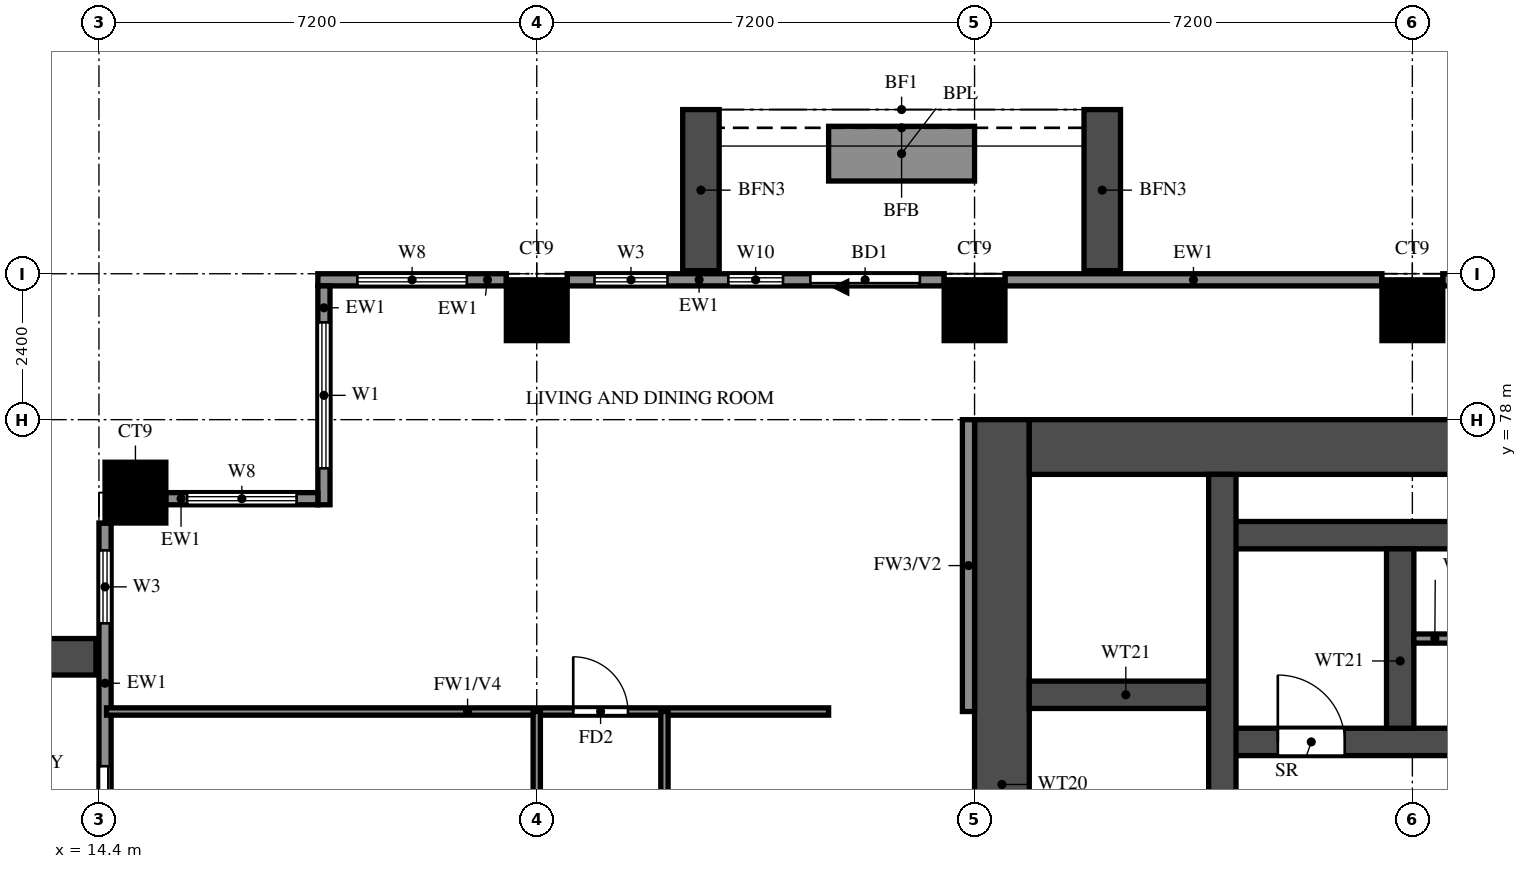
"""IFC4 building model, lengths in metres.
Left out: names, types, materials, properties, quantities, classifications, styles, units other than length and angle.
Written with IfcOpenShell. Run it as: python <this file> out.ifc"""

import sys

from ifc_helpers import new_model, si_unit, direction, frame, frame_2d, origin, origin_2d, place, context, subcontext, project, spatial, rectangle, extrude, source, transform, mapped, element, fill, save


model = new_model("IFC4")
c1 = context("Model", 3, precision=1e-05, world=origin(), true_north=direction((0.0, 1.0)))
c2 = subcontext(c1, "Body", "Model", "MODEL_VIEW")
j1 = project(units=[si_unit("LENGTHUNIT", "METRE"), si_unit("PLANEANGLEUNIT", "RADIAN")], contexts=[c1])
p1 = place(None, origin())
s1 = spatial("IfcSite", under=j1, at=p1, CompositionType="ELEMENT")
p2 = place(p1, origin())
s2 = spatial("IfcBuilding", under=s1, at=p2, CompositionType="ELEMENT")
p3 = place(p2, frame((0.0, 0.0, 86.5)))
s3 = spatial("IfcBuildingStorey", under=s2, at=p3, CompositionType="ELEMENT", Elevation=86.5)
m1 = source(origin(), c2, "Body", "SweptSolid", [
    extrude(rectangle(XDim=1.0, YDim=1.0, at=origin_2d()), origin(), (0.0, 0.0, 1.0), 3.18),
])
for number, where, z_axis, x_axis in (
    (1, (15.0, 76.8, 0.0), (0.0, 0.0, 1.0), (1.0, 0.0, 0.0)),
    (2, (21.6, 79.8, 0.0), (0.0, 0.0, 1.0), (1.0, 0.0, 0.0)),
    (3, (28.8, 79.8, 0.0), (0.0, 0.0, 1.0), (1.0, 0.0, 0.0)),
    (4, (36.0, 79.8, 0.0), (0.0, 0.0, 1.0), (1.0, 0.0, 0.0)),
):
    element("IfcColumn", number, at=place(p3, frame(where, z_axis=z_axis, x_axis=x_axis)), inside=s3, PredefinedType="COLUMN", context=c2, shape_type="MappedRepresentation", body=[
        mapped(m1, transform((0.0, 0.0, 0.0))),
    ])
p4 = place(p3, frame((29.25, 66.0, 0.0), z_axis=(0.0, 0.0, 1.0), x_axis=(0.0, 1.0, 0.0)))
e5 = element("IfcWall", 5, at=p4, inside=s3, PredefinedType="SHEAR", context=c2, shape_type="SweptSolid", body=[
    extrude(rectangle(XDim=12.0, YDim=0.9, at=frame_2d((6.0, 0.0))), origin(), (0.0, 0.0, 1.0), 3.18),
])
p5 = place(p3, frame((29.7, 77.55, 0.0), z_axis=(0.0, 0.0, 1.0), x_axis=(1.0, 0.0, 0.0)))
e6 = element("IfcWall", 6, at=p5, inside=s3, PredefinedType="SHEAR", context=c2, shape_type="SweptSolid", body=[
    extrude(rectangle(XDim=41.4, YDim=0.9, at=frame_2d((20.7, 0.0))), origin(), (0.0, 0.0, 1.0), 3.18),
])
p6 = place(p3, frame((32.875, 72.7, 0.0), z_axis=(0.0, 0.0, 1.0), x_axis=(1.0, 0.0, 0.0)))
e7 = element("IfcWall", 7, at=p6, inside=s3, PredefinedType="SHEAR", context=c2, shape_type="SweptSolid", body=[
    extrude(rectangle(XDim=35.05, YDim=0.45, at=frame_2d((17.525, 0.0))), origin(), (0.0, 0.0, 1.0), 3.18),
])
p7 = place(p6, frame((19.8, 0.0, 0.0)))
e8 = element("IfcOpeningElement", 8, at=p7, cuts=e7, PredefinedType="OPENING", context=c2, shape_type="SweptSolid", body=[
    extrude(rectangle(XDim=1.1, YDim=2.1, at=frame_2d((0.55, 1.05))), frame((0.0, 0.235, 0.0), z_axis=(0.0, -1.0, 0.0), x_axis=(1.0, 0.0, 0.0)), (0.0, 0.0, 1.0), 0.47),
])
p8 = place(p6, frame((27.65, 0.0, 0.0)))
e9 = element("IfcOpeningElement", 9, at=p8, cuts=e7, PredefinedType="OPENING", context=c2, shape_type="SweptSolid", body=[
    extrude(rectangle(XDim=1.1, YDim=2.1, at=frame_2d((0.55, 1.05))), frame((0.0, 0.235, 0.0), z_axis=(0.0, -1.0, 0.0), x_axis=(1.0, 0.0, 0.0)), (0.0, 0.0, 1.0), 0.47),
])
p9 = place(p6, frame((30.25, 0.0, 0.0)))
e10 = element("IfcOpeningElement", 10, at=p9, cuts=e7, PredefinedType="OPENING", context=c2, shape_type="SweptSolid", body=[
    extrude(rectangle(XDim=1.1, YDim=2.1, at=frame_2d((0.55, 1.05))), frame((0.0, 0.235, 0.0), z_axis=(0.0, -1.0, 0.0), x_axis=(1.0, 0.0, 0.0)), (0.0, 0.0, 1.0), 0.47),
])
p10 = place(p6, frame((3.75, 0.0, 0.0)))
e11 = element("IfcOpeningElement", 11, at=p10, cuts=e7, PredefinedType="OPENING", context=c2, shape_type="SweptSolid", body=[
    extrude(rectangle(XDim=1.1, YDim=2.1, at=frame_2d((0.55, 1.05))), frame((0.0, 0.235, 0.0), z_axis=(0.0, -1.0, 0.0), x_axis=(1.0, 0.0, 0.0)), (0.0, 0.0, 1.0), 0.47),
])
p11 = place(p6, frame((6.5, 0.0, 0.0)))
e12 = element("IfcOpeningElement", 12, at=p11, cuts=e7, PredefinedType="OPENING", context=c2, shape_type="SweptSolid", body=[
    extrude(rectangle(XDim=1.1, YDim=2.1, at=frame_2d((0.55, 1.05))), frame((0.0, 0.235, 0.0), z_axis=(0.0, -1.0, 0.0), x_axis=(1.0, 0.0, 0.0)), (0.0, 0.0, 1.0), 0.47),
])
p12 = place(p6, frame((9.25, 0.0, 0.0)))
e13 = element("IfcOpeningElement", 13, at=p12, cuts=e7, PredefinedType="OPENING", context=c2, shape_type="SweptSolid", body=[
    extrude(rectangle(XDim=1.1, YDim=2.1, at=frame_2d((0.55, 1.05))), frame((0.0, 0.235, 0.0), z_axis=(0.0, -1.0, 0.0), x_axis=(1.0, 0.0, 0.0)), (0.0, 0.0, 1.0), 0.47),
])
p13 = place(p6, frame((12.0, 0.0, 0.0)))
e14 = element("IfcOpeningElement", 14, at=p13, cuts=e7, PredefinedType="OPENING", context=c2, shape_type="SweptSolid", body=[
    extrude(rectangle(XDim=1.1, YDim=2.1, at=frame_2d((0.55, 1.05))), frame((0.0, 0.235, 0.0), z_axis=(0.0, -1.0, 0.0), x_axis=(1.0, 0.0, 0.0)), (0.0, 0.0, 1.0), 0.47),
])
p14 = place(p6, frame((14.75, 0.0, 0.0)))
e15 = element("IfcOpeningElement", 15, at=p14, cuts=e7, PredefinedType="OPENING", context=c2, shape_type="SweptSolid", body=[
    extrude(rectangle(XDim=1.1, YDim=2.1, at=frame_2d((0.55, 1.05))), frame((0.0, 0.235, 0.0), z_axis=(0.0, -1.0, 0.0), x_axis=(1.0, 0.0, 0.0)), (0.0, 0.0, 1.0), 0.47),
])
p15 = place(p6, frame((17.5, 0.0, 0.0)))
e16 = element("IfcOpeningElement", 16, at=p15, cuts=e7, PredefinedType="OPENING", context=c2, shape_type="SweptSolid", body=[
    extrude(rectangle(XDim=1.1, YDim=2.1, at=frame_2d((0.55, 1.05))), frame((0.0, 0.235, 0.0), z_axis=(0.0, -1.0, 0.0), x_axis=(1.0, 0.0, 0.0)), (0.0, 0.0, 1.0), 0.47),
])
p16 = place(p6, frame((0.913, 0.0, 0.0)))
e17 = element("IfcOpeningElement", 17, at=p16, cuts=e7, PredefinedType="OPENING", context=c2, shape_type="SweptSolid", body=[
    extrude(rectangle(XDim=1.1, YDim=2.1, at=frame_2d((0.55, 1.05))), frame((0.0, 0.235, 0.0), z_axis=(0.0, -1.0, 0.0), x_axis=(1.0, 0.0, 0.0)), (0.0, 0.0, 1.0), 0.47),
])
p17 = place(p3, frame((32.875, 76.1, 0.0), z_axis=(0.0, 0.0, 1.0), x_axis=(1.0, 0.0, 0.0)))
e18 = element("IfcWall", 18, at=p17, inside=s3, PredefinedType="SHEAR", context=c2, shape_type="SweptSolid", body=[
    extrude(rectangle(XDim=35.05, YDim=0.45, at=frame_2d((17.525, 0.0))), origin(), (0.0, 0.0, 1.0), 3.18),
])
p18 = place(p3, frame((29.7, 73.475, 0.0), z_axis=(0.0, 0.0, 1.0), x_axis=(1.0, 0.0, 0.0)))
e19 = element("IfcWall", 19, at=p18, inside=s3, PredefinedType="SHEAR", context=c2, shape_type="SweptSolid", body=[
    extrude(rectangle(XDim=3.175, YDim=0.45, at=frame_2d((1.587, 0.0))), origin(), (0.0, 0.0, 1.0), 3.18),
])
p19 = place(p3, frame((32.875, 66.45, 0.0), z_axis=(0.0, 0.0, 1.0), x_axis=(0.0, 1.0, 0.0)))
e20 = element("IfcWall", 20, at=p19, inside=s3, PredefinedType="SHEAR", context=c2, shape_type="SweptSolid", body=[
    extrude(rectangle(XDim=10.65, YDim=0.45, at=frame_2d((5.325, 0.0))), origin(), (0.0, 0.0, 1.0), 3.18),
])
p20 = place(p3, frame((35.8, 72.925, 0.0), z_axis=(0.0, 0.0, 1.0), x_axis=(0.0, 1.0, 0.0)))
e21 = element("IfcWall", 21, at=p20, inside=s3, PredefinedType="SHEAR", context=c2, shape_type="SweptSolid", body=[
    extrude(rectangle(XDim=2.95, YDim=0.45, at=frame_2d((1.475, 0.0))), origin(), (0.0, 0.0, 1.0), 3.18),
])
for number, where, z_axis, x_axis in (
    (22, (42.7, 80.3, 0.0), (0.0, 0.0, 1.0), (-1.0, 0.0, 0.0)),
    (23, (35.5, 80.3, 0.0), (0.0, 0.0, 1.0), (-1.0, 0.0, 0.0)),
):
    element("IfcWall", number, at=place(p3, frame(where, z_axis=z_axis, x_axis=x_axis)), inside=s3, PredefinedType="SOLIDWALL", context=c2, shape_type="SweptSolid", body=[
        extrude(rectangle(XDim=6.2, YDim=0.2, at=frame_2d((3.1, 0.0))), origin(), (0.0, 0.0, 1.0), 3.18),
    ])
p21 = place(p3, frame((28.3, 80.3, 0.0), z_axis=(0.0, 0.0, 1.0), x_axis=(-1.0, 0.0, 0.0)))
e24 = element("IfcWall", 24, at=p21, inside=s3, PredefinedType="SOLIDWALL", context=c2, shape_type="SweptSolid", body=[
    extrude(rectangle(XDim=6.2, YDim=0.2, at=frame_2d((3.1, 0.0))), origin(), (0.0, 0.0, 1.0), 3.18),
])
p22 = place(p21, frame((0.4, 0.0, 0.0)))
e25 = element("IfcOpeningElement", 25, at=p22, cuts=e24, PredefinedType="OPENING", context=c2, shape_type="SweptSolid", body=[
    extrude(rectangle(XDim=1.8, YDim=2.4, at=frame_2d((0.9, 1.2))), frame((0.0, 0.11, 0.0), z_axis=(0.0, -1.0, 0.0), x_axis=(1.0, 0.0, 0.0)), (0.0, 0.0, 1.0), 0.22),
])
p23 = place(p21, frame((2.65, 0.0, 0.6)))
e26 = element("IfcOpeningElement", 26, at=p23, cuts=e24, PredefinedType="OPENING", context=c2, shape_type="SweptSolid", body=[
    extrude(rectangle(XDim=0.9, YDim=2.4, at=frame_2d((0.45, 1.2))), frame((0.0, 0.11, 0.0), z_axis=(0.0, -1.0, 0.0), x_axis=(1.0, 0.0, 0.0)), (0.0, 0.0, 1.0), 0.22),
])
p24 = place(p21, frame((4.55, 0.0, 0.6)))
e27 = element("IfcOpeningElement", 27, at=p24, cuts=e24, PredefinedType="OPENING", context=c2, shape_type="SweptSolid", body=[
    extrude(rectangle(XDim=1.2, YDim=2.4, at=frame_2d((0.6, 1.2))), frame((0.0, 0.11, 0.0), z_axis=(0.0, -1.0, 0.0), x_axis=(1.0, 0.0, 0.0)), (0.0, 0.0, 1.0), 0.22),
])
p25 = place(p3, frame((21.1, 80.3, 0.0), z_axis=(0.0, 0.0, 1.0), x_axis=(-1.0, 0.0, 0.0)))
e28 = element("IfcWall", 28, at=p25, inside=s3, PredefinedType="SOLIDWALL", context=c2, shape_type="SweptSolid", body=[
    extrude(rectangle(XDim=3.1, YDim=0.2, at=frame_2d((1.55, 0.0))), origin(), (0.0, 0.0, 1.0), 3.18),
])
p26 = place(p25, frame((0.65, 0.0, 0.6)))
e29 = element("IfcOpeningElement", 29, at=p26, cuts=e28, PredefinedType="OPENING", context=c2, shape_type="SweptSolid", body=[
    extrude(rectangle(XDim=1.8, YDim=2.4, at=frame_2d((0.9, 1.2))), frame((0.0, 0.11, 0.0), z_axis=(0.0, -1.0, 0.0), x_axis=(1.0, 0.0, 0.0)), (0.0, 0.0, 1.0), 0.22),
])
p27 = place(p3, frame((18.1, 80.2, 0.0), z_axis=(0.0, 0.0, 1.0), x_axis=(0.0, -1.0, 0.0)))
e30 = element("IfcWall", 30, at=p27, inside=s3, PredefinedType="SOLIDWALL", context=c2, shape_type="SweptSolid", body=[
    extrude(rectangle(XDim=3.6, YDim=0.2, at=frame_2d((1.8, 0.0))), origin(), (0.0, 0.0, 1.0), 3.18),
])
p28 = place(p27, frame((0.6, 0.0, 0.6)))
e31 = element("IfcOpeningElement", 31, at=p28, cuts=e30, PredefinedType="OPENING", context=c2, shape_type="SweptSolid", body=[
    extrude(rectangle(XDim=2.4, YDim=2.4, at=frame_2d((1.2, 1.2))), frame((0.0, 0.11, 0.0), z_axis=(0.0, -1.0, 0.0), x_axis=(1.0, 0.0, 0.0)), (0.0, 0.0, 1.0), 0.22),
])
p29 = place(p3, frame((18.0, 76.7, 0.0), z_axis=(0.0, 0.0, 1.0), x_axis=(-1.0, 0.0, 0.0)))
e32 = element("IfcWall", 32, at=p29, inside=s3, PredefinedType="SOLIDWALL", context=c2, shape_type="SweptSolid", body=[
    extrude(rectangle(XDim=2.5, YDim=0.2, at=frame_2d((1.25, 0.0))), origin(), (0.0, 0.0, 1.0), 3.18),
])
p30 = place(p29, frame((0.35, 0.0, 0.6)))
e33 = element("IfcOpeningElement", 33, at=p30, cuts=e32, PredefinedType="OPENING", context=c2, shape_type="SweptSolid", body=[
    extrude(rectangle(XDim=1.8, YDim=2.4, at=frame_2d((0.9, 1.2))), frame((0.0, 0.11, 0.0), z_axis=(0.0, -1.0, 0.0), x_axis=(1.0, 0.0, 0.0)), (0.0, 0.0, 1.0), 0.22),
])
p31 = place(p3, frame((14.5, 76.3, 0.0), z_axis=(0.0, 0.0, 1.0), x_axis=(0.0, -1.0, 0.0)))
e34 = element("IfcWall", 34, at=p31, inside=s3, PredefinedType="SOLIDWALL", context=c2, shape_type="SweptSolid", body=[
    extrude(rectangle(XDim=6.2, YDim=0.2, at=frame_2d((3.1, 0.0))), origin(), (0.0, 0.0, 1.0), 3.18),
])
p32 = place(p31, frame((4.0, 0.0, 0.0)))
e35 = element("IfcOpeningElement", 35, at=p32, cuts=e34, PredefinedType="OPENING", context=c2, shape_type="SweptSolid", body=[
    extrude(rectangle(XDim=1.8, YDim=2.4, at=frame_2d((0.9, 1.2))), frame((0.0, 0.11, 0.0), z_axis=(0.0, -1.0, 0.0), x_axis=(1.0, 0.0, 0.0)), (0.0, 0.0, 1.0), 0.22),
])
p33 = place(p31, frame((0.45, 0.0, 0.6)))
e36 = element("IfcOpeningElement", 36, at=p33, cuts=e34, PredefinedType="OPENING", context=c2, shape_type="SweptSolid", body=[
    extrude(rectangle(XDim=1.2, YDim=2.4, at=frame_2d((0.6, 1.2))), frame((0.0, 0.11, 0.0), z_axis=(0.0, -1.0, 0.0), x_axis=(1.0, 0.0, 0.0)), (0.0, 0.0, 1.0), 0.22),
])
for number, where, z_axis, x_axis in (
    (37, (30.9, 80.45, 0.0), (0.0, 0.0, 1.0), (0.0, 1.0, 0.0)),
    (38, (24.3, 80.45, 0.0), (0.0, 0.0, 1.0), (0.0, 1.0, 0.0)),
):
    element("IfcWall", number, at=place(p3, frame(where, z_axis=z_axis, x_axis=x_axis)), inside=s3, PredefinedType="SOLIDWALL", context=c2, shape_type="SweptSolid", body=[
        extrude(rectangle(XDim=2.65, YDim=0.6, at=frame_2d((1.325, 0.0))), origin(), (0.0, 0.0, 1.0), 2.85),
    ])
p34 = place(p3, frame((28.8, 82.375, 0.0), z_axis=(0.0, 0.0, 1.0), x_axis=(-1.0, 0.0, 0.0)))
e39 = element("IfcWall", 39, at=p34, inside=s3, PredefinedType="SOLIDWALL", context=c2, shape_type="SweptSolid", body=[
    extrude(rectangle(XDim=2.4, YDim=0.9, at=frame_2d((1.2, 0.0))), origin(), (0.0, 0.0, 1.0), 0.9),
])
p35 = place(p3, frame((14.35, 74.1, 0.0), z_axis=(0.0, 0.0, 1.0), x_axis=(-1.0, 0.0, 0.0)))
e40 = element("IfcWall", 40, at=p35, inside=s3, PredefinedType="SOLIDWALL", context=c2, shape_type="SweptSolid", body=[
    extrude(rectangle(XDim=2.65, YDim=0.6, at=frame_2d((1.325, 0.0))), origin(), (0.0, 0.0, 1.0), 2.85),
])
p36 = place(p3, frame((36.025, 74.4, 0.0), z_axis=(0.0, 0.0, 1.0), x_axis=(1.0, 0.0, 0.0)))
e41 = element("IfcWall", 41, at=p36, inside=s3, PredefinedType="PARTITIONING", context=c2, shape_type="SweptSolid", body=[
    extrude(rectangle(XDim=2.3, YDim=0.15, at=frame_2d((1.15, 0.0))), origin(), (0.0, 0.0, 1.0), 3.18),
])
p37 = place(p36, frame((0.7, 0.0, 0.0)))
e42 = element("IfcOpeningElement", 42, at=p37, cuts=e41, PredefinedType="OPENING", context=c2, shape_type="SweptSolid", body=[
    extrude(rectangle(XDim=0.9, YDim=2.1, at=frame_2d((0.45, 1.05))), frame((0.0, 0.085, 0.0), z_axis=(0.0, -1.0, 0.0), x_axis=(1.0, 0.0, 0.0)), (0.0, 0.0, 1.0), 0.17),
])
p38 = place(p3, frame((28.7, 73.2, 0.0), z_axis=(0.0, 0.0, 1.0), x_axis=(0.0, 1.0, 0.0)))
e43 = element("IfcWall", 43, at=p38, inside=s3, PredefinedType="SOLIDWALL", context=c2, shape_type="SweptSolid", body=[
    extrude(rectangle(XDim=4.8, YDim=0.2, at=frame_2d((2.4, 0.0))), origin(), (0.0, 0.0, 1.0), 3.18),
])
p39 = place(p3, frame((14.525, 73.2, 0.0), z_axis=(0.0, 0.0, 1.0), x_axis=(1.0, 0.0, 0.0)))
e44 = element("IfcWall", 44, at=p39, inside=s3, PredefinedType="PARTITIONING", context=c2, shape_type="SweptSolid", body=[
    extrude(rectangle(XDim=11.875, YDim=0.12, at=frame_2d((5.938, 0.0))), origin(), (0.0, 0.0, 1.0), 2.28),
])
p40 = place(p39, frame((7.675, 0.0, 0.0)))
e45 = element("IfcOpeningElement", 45, at=p40, cuts=e44, PredefinedType="OPENING", context=c2, shape_type="SweptSolid", body=[
    extrude(rectangle(XDim=0.9, YDim=2.1, at=frame_2d((0.45, 1.05))), frame((0.0, 0.07, 0.0), z_axis=(0.0, -1.0, 0.0), x_axis=(1.0, 0.0, 0.0)), (0.0, 0.0, 1.0), 0.14),
])
p41 = place(p3, frame((21.6, 69.6, 0.0), z_axis=(0.0, 0.0, 1.0), x_axis=(0.0, 1.0, 0.0)))
e46 = element("IfcWall", 46, at=p41, inside=s3, PredefinedType="PARTITIONING", context=c2, shape_type="SweptSolid", body=[
    extrude(rectangle(XDim=3.6, YDim=0.12, at=frame_2d((1.8, 0.0))), origin(), (0.0, 0.0, 1.0), 3.18),
])
p42 = place(p41, frame((1.35, 0.0, 0.0)))
e47 = element("IfcOpeningElement", 47, at=p42, cuts=e46, PredefinedType="OPENING", context=c2, shape_type="SweptSolid", body=[
    extrude(rectangle(XDim=0.9, YDim=2.1, at=frame_2d((0.45, 1.05))), frame((0.0, 0.07, 0.0), z_axis=(0.0, -1.0, 0.0), x_axis=(1.0, 0.0, 0.0)), (0.0, 0.0, 1.0), 0.14),
])
p43 = place(p3, frame((23.7, 64.8, 0.0), z_axis=(0.0, 0.0, 1.0), x_axis=(0.0, 1.0, 0.0)))
e48 = element("IfcWall", 48, at=p43, inside=s3, PredefinedType="PARTITIONING", context=c2, shape_type="SweptSolid", body=[
    extrude(rectangle(XDim=8.4, YDim=0.12, at=frame_2d((4.2, 0.0))), origin(), (0.0, 0.0, 1.0), 3.18),
])
p44 = place(p43, frame((1.875, 0.0, 0.0)))
e49 = element("IfcOpeningElement", 49, at=p44, cuts=e48, PredefinedType="OPENING", context=c2, shape_type="SweptSolid", body=[
    extrude(rectangle(XDim=0.9, YDim=2.1, at=frame_2d((0.45, 1.05))), frame((0.0, 0.07, 0.0), z_axis=(0.0, -1.0, 0.0), x_axis=(1.0, 0.0, 0.0)), (0.0, 0.0, 1.0), 0.14),
])
p45 = place(p43, frame((6.075, 0.0, 0.0)))
e50 = element("IfcOpeningElement", 50, at=p45, cuts=e48, PredefinedType="OPENING", context=c2, shape_type="SweptSolid", body=[
    extrude(rectangle(XDim=0.9, YDim=2.1, at=frame_2d((0.45, 1.05))), frame((0.0, 0.07, 0.0), z_axis=(0.0, -1.0, 0.0), x_axis=(1.0, 0.0, 0.0)), (0.0, 0.0, 1.0), 0.14),
])
p46 = place(p22, origin())
e51 = element("IfcDoor", 51, at=p46, inside=s3, OperationType="DOUBLE_DOOR_SLIDING", PredefinedType="DOOR", context=c2, shape_type="SweptSolid", body=[
    extrude(rectangle(XDim=1.8, YDim=2.4, at=frame_2d((0.9, 1.2))), frame((0.0, 0.025, 0.0), z_axis=(0.0, -1.0, 0.0), x_axis=(1.0, 0.0, 0.0)), (0.0, 0.0, 1.0), 0.05),
])
fill(e25, e51)
p47 = place(p23, origin())
e52 = element("IfcWindow", 52, at=p47, inside=s3, PartitioningType="SINGLE_PANEL", PredefinedType="WINDOW", context=c2, shape_type="SweptSolid", body=[
    extrude(rectangle(XDim=0.9, YDim=2.4, at=frame_2d((0.45, 1.2))), frame((0.0, 0.03, 0.0), z_axis=(0.0, -1.0, 0.0), x_axis=(1.0, 0.0, 0.0)), (0.0, 0.0, 1.0), 0.06),
])
fill(e26, e52)
p48 = place(p24, origin())
e53 = element("IfcWindow", 53, at=p48, inside=s3, PartitioningType="SINGLE_PANEL", PredefinedType="WINDOW", context=c2, shape_type="SweptSolid", body=[
    extrude(rectangle(XDim=1.2, YDim=2.4, at=frame_2d((0.6, 1.2))), frame((0.0, 0.03, 0.0), z_axis=(0.0, -1.0, 0.0), x_axis=(1.0, 0.0, 0.0)), (0.0, 0.0, 1.0), 0.06),
])
fill(e27, e53)
p49 = place(p26, origin())
e54 = element("IfcWindow", 54, at=p49, inside=s3, PartitioningType="DOUBLE_PANEL_VERTICAL", PredefinedType="WINDOW", context=c2, shape_type="SweptSolid", body=[
    extrude(rectangle(XDim=1.8, YDim=2.4, at=frame_2d((0.9, 1.2))), frame((0.0, 0.03, 0.0), z_axis=(0.0, -1.0, 0.0), x_axis=(1.0, 0.0, 0.0)), (0.0, 0.0, 1.0), 0.06),
])
fill(e29, e54)
p50 = place(p28, origin())
e55 = element("IfcWindow", 55, at=p50, inside=s3, PartitioningType="DOUBLE_PANEL_VERTICAL", PredefinedType="WINDOW", context=c2, shape_type="SweptSolid", body=[
    extrude(rectangle(XDim=2.4, YDim=2.4, at=frame_2d((1.2, 1.2))), frame((0.0, 0.03, 0.0), z_axis=(0.0, -1.0, 0.0), x_axis=(1.0, 0.0, 0.0)), (0.0, 0.0, 1.0), 0.06),
])
fill(e31, e55)
p51 = place(p30, origin())
e56 = element("IfcWindow", 56, at=p51, inside=s3, PartitioningType="DOUBLE_PANEL_VERTICAL", PredefinedType="WINDOW", context=c2, shape_type="SweptSolid", body=[
    extrude(rectangle(XDim=1.8, YDim=2.4, at=frame_2d((0.9, 1.2))), frame((0.0, 0.03, 0.0), z_axis=(0.0, -1.0, 0.0), x_axis=(1.0, 0.0, 0.0)), (0.0, 0.0, 1.0), 0.06),
])
fill(e33, e56)
p52 = place(p32, origin())
e57 = element("IfcDoor", 57, at=p52, inside=s3, OperationType="DOUBLE_DOOR_SLIDING", PredefinedType="DOOR", context=c2, shape_type="SweptSolid", body=[
    extrude(rectangle(XDim=1.8, YDim=2.4, at=frame_2d((0.9, 1.2))), frame((0.0, 0.025, 0.0), z_axis=(0.0, -1.0, 0.0), x_axis=(1.0, 0.0, 0.0)), (0.0, 0.0, 1.0), 0.05),
])
fill(e35, e57)
p53 = place(p33, origin())
e58 = element("IfcWindow", 58, at=p53, inside=s3, PartitioningType="SINGLE_PANEL", PredefinedType="WINDOW", context=c2, shape_type="SweptSolid", body=[
    extrude(rectangle(XDim=1.2, YDim=2.4, at=frame_2d((0.6, 1.2))), frame((0.0, 0.03, 0.0), z_axis=(0.0, -1.0, 0.0), x_axis=(1.0, 0.0, 0.0)), (0.0, 0.0, 1.0), 0.06),
])
fill(e36, e58)
p54 = place(p16, origin())
e59 = element("IfcDoor", 59, at=p54, inside=s3, OperationType="SINGLE_SWING_LEFT", PredefinedType="DOOR", context=c2, shape_type="SweptSolid", body=[
    extrude(rectangle(XDim=1.1, YDim=2.1, at=frame_2d((0.55, 1.05))), frame((0.0, 0.025, 0.0), z_axis=(0.0, -1.0, 0.0), x_axis=(1.0, 0.0, 0.0)), (0.0, 0.0, 1.0), 0.05),
])
fill(e17, e59)
p55 = place(p40, origin())
e60 = element("IfcDoor", 60, at=p55, inside=s3, OperationType="SINGLE_SWING_LEFT", PredefinedType="DOOR", context=c2, shape_type="SweptSolid", body=[
    extrude(rectangle(XDim=0.9, YDim=2.1, at=frame_2d((0.45, 1.05))), frame((0.0, 0.025, 0.0), z_axis=(0.0, -1.0, 0.0), x_axis=(1.0, 0.0, 0.0)), (0.0, 0.0, 1.0), 0.05),
])
fill(e45, e60)
save(model, sys.argv[1])
